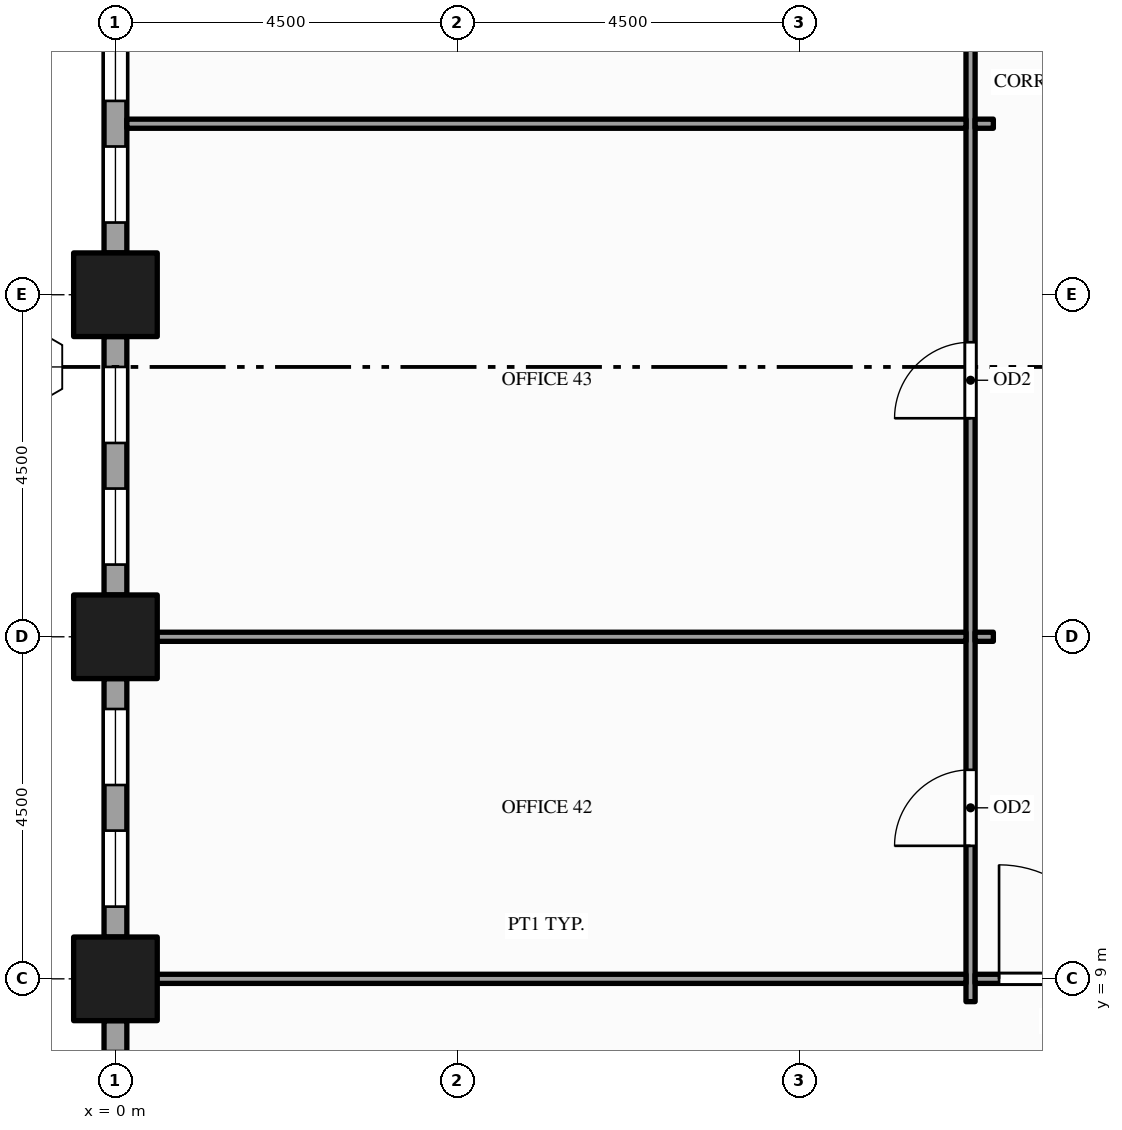
"""IFC4 building model, lengths in metres.
Left out: names, types, materials, properties, quantities, classifications, styles, units other than length and angle.
Written with IfcOpenShell. Run it as: python <this file> out.ifc"""

import sys

from ifc_helpers import new_model, si_unit, direction, frame, frame_2d, origin, origin_2d, place, context, subcontext, project, spatial, rectangle, hollow_rectangle, extrude, element, fill, save


model = new_model("IFC4")
c1 = context("Model", 3, precision=1e-05, world=origin(), true_north=direction((0.0, 1.0)))
c2 = subcontext(c1, "Body", "Model", "MODEL_VIEW")
j1 = project(units=[si_unit("LENGTHUNIT", "METRE"), si_unit("PLANEANGLEUNIT", "RADIAN")], contexts=[c1])
p1 = place(None, origin())
s1 = spatial("IfcSite", under=j1, at=p1, CompositionType="ELEMENT")
p2 = place(p1, origin())
s2 = spatial("IfcBuilding", under=s1, at=p2, CompositionType="ELEMENT")
p3 = place(p2, frame((0.0, 0.0, 57.0)))
s3 = spatial("IfcBuildingStorey", under=s2, at=p3, CompositionType="ELEMENT", Elevation=57.0)
for number, where, z_axis, x_axis in (
    (1, (0.0, 9.0, -0.15), (0.0, 0.0, 1.0), (1.0, 0.0, 0.0)),
    (2, (0.0, 13.5, -0.15), (0.0, 0.0, 1.0), (1.0, 0.0, 0.0)),
    (3, (0.0, 18.0, -0.15), (0.0, 0.0, 1.0), (1.0, 0.0, 0.0)),
):
    element("IfcColumn", number, at=place(p3, frame(where, z_axis=z_axis, x_axis=x_axis)), inside=s3, PredefinedType="COLUMN", context=c2, shape_type="SweptSolid", body=[
        extrude(hollow_rectangle(XDim=1.1, YDim=1.1, WallThickness=0.06, at=origin_2d()), origin(), (0.0, 0.0, 1.0), 4.0),
    ])
p4 = place(p3, frame((0.0, 21.95, 0.0), z_axis=(0.0, 0.0, 1.0), x_axis=(0.0, -1.0, 0.0)))
e4 = element("IfcWall", 4, at=p4, inside=s3, PredefinedType="STANDARD", context=c2, shape_type="SweptSolid", body=[
    extrude(rectangle(XDim=3.4, YDim=0.3, at=frame_2d((1.7, 0.0))), origin(), (0.0, 0.0, 1.0), 3.144),
])
p5 = place(p4, frame((0.4, 0.0, 0.9)))
e5 = element("IfcOpeningElement", 5, at=p5, cuts=e4, PredefinedType="OPENING", context=c2, shape_type="SweptSolid", body=[
    extrude(rectangle(XDim=1.0, YDim=2.0, at=frame_2d((0.5, 1.0))), frame((0.0, 0.16, 0.0), z_axis=(0.0, -1.0, 0.0), x_axis=(1.0, 0.0, 0.0)), (0.0, 0.0, 1.0), 0.32),
])
p6 = place(p4, frame((2.0, 0.0, 0.9)))
e6 = element("IfcOpeningElement", 6, at=p6, cuts=e4, PredefinedType="OPENING", context=c2, shape_type="SweptSolid", body=[
    extrude(rectangle(XDim=1.0, YDim=2.0, at=frame_2d((0.5, 1.0))), frame((0.0, 0.16, 0.0), z_axis=(0.0, -1.0, 0.0), x_axis=(1.0, 0.0, 0.0)), (0.0, 0.0, 1.0), 0.32),
])
p7 = place(p3, frame((0.0, 17.45, 0.0), z_axis=(0.0, 0.0, 1.0), x_axis=(0.0, -1.0, 0.0)))
e7 = element("IfcWall", 7, at=p7, inside=s3, PredefinedType="STANDARD", context=c2, shape_type="SweptSolid", body=[
    extrude(rectangle(XDim=3.4, YDim=0.3, at=frame_2d((1.7, 0.0))), origin(), (0.0, 0.0, 1.0), 3.144),
])
p8 = place(p7, frame((0.4, 0.0, 0.9)))
e8 = element("IfcOpeningElement", 8, at=p8, cuts=e7, PredefinedType="OPENING", context=c2, shape_type="SweptSolid", body=[
    extrude(rectangle(XDim=1.0, YDim=2.0, at=frame_2d((0.5, 1.0))), frame((0.0, 0.16, 0.0), z_axis=(0.0, -1.0, 0.0), x_axis=(1.0, 0.0, 0.0)), (0.0, 0.0, 1.0), 0.32),
])
p9 = place(p7, frame((2.0, 0.0, 0.9)))
e9 = element("IfcOpeningElement", 9, at=p9, cuts=e7, PredefinedType="OPENING", context=c2, shape_type="SweptSolid", body=[
    extrude(rectangle(XDim=1.0, YDim=2.0, at=frame_2d((0.5, 1.0))), frame((0.0, 0.16, 0.0), z_axis=(0.0, -1.0, 0.0), x_axis=(1.0, 0.0, 0.0)), (0.0, 0.0, 1.0), 0.32),
])
p10 = place(p3, frame((0.0, 12.95, 0.0), z_axis=(0.0, 0.0, 1.0), x_axis=(0.0, -1.0, 0.0)))
e10 = element("IfcWall", 10, at=p10, inside=s3, PredefinedType="STANDARD", context=c2, shape_type="SweptSolid", body=[
    extrude(rectangle(XDim=3.4, YDim=0.3, at=frame_2d((1.7, 0.0))), origin(), (0.0, 0.0, 1.0), 3.144),
])
p11 = place(p10, frame((0.4, 0.0, 0.9)))
e11 = element("IfcOpeningElement", 11, at=p11, cuts=e10, PredefinedType="OPENING", context=c2, shape_type="SweptSolid", body=[
    extrude(rectangle(XDim=1.0, YDim=2.0, at=frame_2d((0.5, 1.0))), frame((0.0, 0.16, 0.0), z_axis=(0.0, -1.0, 0.0), x_axis=(1.0, 0.0, 0.0)), (0.0, 0.0, 1.0), 0.32),
])
p12 = place(p10, frame((2.0, 0.0, 0.9)))
e12 = element("IfcOpeningElement", 12, at=p12, cuts=e10, PredefinedType="OPENING", context=c2, shape_type="SweptSolid", body=[
    extrude(rectangle(XDim=1.0, YDim=2.0, at=frame_2d((0.5, 1.0))), frame((0.0, 0.16, 0.0), z_axis=(0.0, -1.0, 0.0), x_axis=(1.0, 0.0, 0.0)), (0.0, 0.0, 1.0), 0.32),
])
p13 = place(p3, frame((0.0, 8.45, 0.0), z_axis=(0.0, 0.0, 1.0), x_axis=(0.0, -1.0, 0.0)))
e13 = element("IfcWall", 13, at=p13, inside=s3, PredefinedType="STANDARD", context=c2, shape_type="SweptSolid", body=[
    extrude(rectangle(XDim=3.4, YDim=0.3, at=frame_2d((1.7, 0.0))), origin(), (0.0, 0.0, 1.0), 3.144),
])
p14 = place(p13, frame((0.4, 0.0, 0.9)))
e14 = element("IfcOpeningElement", 14, at=p14, cuts=e13, PredefinedType="OPENING", context=c2, shape_type="SweptSolid", body=[
    extrude(rectangle(XDim=1.0, YDim=2.0, at=frame_2d((0.5, 1.0))), frame((0.0, 0.16, 0.0), z_axis=(0.0, -1.0, 0.0), x_axis=(1.0, 0.0, 0.0)), (0.0, 0.0, 1.0), 0.32),
])
p15 = place(p13, frame((2.0, 0.0, 0.9)))
e15 = element("IfcOpeningElement", 15, at=p15, cuts=e13, PredefinedType="OPENING", context=c2, shape_type="SweptSolid", body=[
    extrude(rectangle(XDim=1.0, YDim=2.0, at=frame_2d((0.5, 1.0))), frame((0.0, 0.16, 0.0), z_axis=(0.0, -1.0, 0.0), x_axis=(1.0, 0.0, 0.0)), (0.0, 0.0, 1.0), 0.32),
])
p16 = place(p3, frame((11.25, 8.7, 0.0), z_axis=(0.0, 0.0, 1.0), x_axis=(0.0, 1.0, 0.0)))
e16 = element("IfcWall", 16, at=p16, inside=s3, PredefinedType="PARTITIONING", context=c2, shape_type="SweptSolid", body=[
    extrude(rectangle(XDim=23.1, YDim=0.12, at=frame_2d((11.55, 0.0))), origin(), (0.0, 0.0, 1.0), 2.6),
])
p17 = place(p16, frame((2.05, 0.0, 0.0)))
e17 = element("IfcOpeningElement", 17, at=p17, cuts=e16, PredefinedType="OPENING", context=c2, shape_type="SweptSolid", body=[
    extrude(rectangle(XDim=1.0, YDim=2.1, at=frame_2d((0.5, 1.05))), frame((0.0, 0.07, 0.0), z_axis=(0.0, -1.0, 0.0), x_axis=(1.0, 0.0, 0.0)), (0.0, 0.0, 1.0), 0.14),
])
p18 = place(p16, frame((7.675, 0.0, 0.0)))
e18 = element("IfcOpeningElement", 18, at=p18, cuts=e16, PredefinedType="OPENING", context=c2, shape_type="SweptSolid", body=[
    extrude(rectangle(XDim=1.0, YDim=2.1, at=frame_2d((0.5, 1.05))), frame((0.0, 0.07, 0.0), z_axis=(0.0, -1.0, 0.0), x_axis=(1.0, 0.0, 0.0)), (0.0, 0.0, 1.0), 0.14),
])
p19 = place(p16, frame((14.055, 0.0, 0.0)))
e19 = element("IfcOpeningElement", 19, at=p19, cuts=e16, PredefinedType="OPENING", context=c2, shape_type="SweptSolid", body=[
    extrude(rectangle(XDim=1.8, YDim=2.1, at=frame_2d((0.9, 1.05))), frame((0.0, 0.07, 0.0), z_axis=(0.0, -1.0, 0.0), x_axis=(1.0, 0.0, 0.0)), (0.0, 0.0, 1.0), 0.14),
])
p20 = place(p3, frame((0.15, 9.0, 0.0), z_axis=(0.0, 0.0, 1.0), x_axis=(1.0, 0.0, 0.0)))
e20 = element("IfcWall", 20, at=p20, inside=s3, PredefinedType="PARTITIONING", context=c2, shape_type="SweptSolid", body=[
    extrude(rectangle(XDim=11.04, YDim=0.12, at=frame_2d((5.52, 0.0))), origin(), (0.0, 0.0, 1.0), 2.938),
])
p21 = place(p3, frame((11.31, 9.0, 0.0), z_axis=(0.0, 0.0, 1.0), x_axis=(1.0, 0.0, 0.0)))
e21 = element("IfcWall", 21, at=p21, inside=s3, PredefinedType="PARTITIONING", context=c2, shape_type="SweptSolid", body=[
    extrude(rectangle(XDim=2.13, YDim=0.12, at=frame_2d((1.065, 0.0))), origin(), (0.0, 0.0, 1.0), 2.938),
])
p22 = place(p21, frame((0.315, 0.0, 0.0)))
e22 = element("IfcOpeningElement", 22, at=p22, cuts=e21, PredefinedType="OPENING", context=c2, shape_type="SweptSolid", body=[
    extrude(rectangle(XDim=1.5, YDim=2.1, at=frame_2d((0.75, 1.05))), frame((0.0, 0.07, 0.0), z_axis=(0.0, -1.0, 0.0), x_axis=(1.0, 0.0, 0.0)), (0.0, 0.0, 1.0), 0.14),
])
p23 = place(p3, frame((0.15, 13.5, 0.0), z_axis=(0.0, 0.0, 1.0), x_axis=(1.0, 0.0, 0.0)))
e23 = element("IfcWall", 23, at=p23, inside=s3, PredefinedType="PARTITIONING", context=c2, shape_type="SweptSolid", body=[
    extrude(rectangle(XDim=11.04, YDim=0.12, at=frame_2d((5.52, 0.0))), origin(), (0.0, 0.0, 1.0), 2.938),
])
p24 = place(p3, frame((11.31, 13.5, 0.0), z_axis=(0.0, 0.0, 1.0), x_axis=(1.0, 0.0, 0.0)))
e24 = element("IfcWall", 24, at=p24, inside=s3, PredefinedType="PARTITIONING", context=c2, shape_type="SweptSolid", body=[
    extrude(rectangle(XDim=0.24, YDim=0.12, at=frame_2d((0.12, 0.0))), origin(), (0.0, 0.0, 1.0), 2.938),
])
p25 = place(p3, frame((0.15, 20.25, 0.0), z_axis=(0.0, 0.0, 1.0), x_axis=(1.0, 0.0, 0.0)))
e25 = element("IfcWall", 25, at=p25, inside=s3, PredefinedType="PARTITIONING", context=c2, shape_type="SweptSolid", body=[
    extrude(rectangle(XDim=11.04, YDim=0.12, at=frame_2d((5.52, 0.0))), origin(), (0.0, 0.0, 1.0), 2.938),
])
p26 = place(p3, frame((11.31, 20.25, 0.0), z_axis=(0.0, 0.0, 1.0), x_axis=(1.0, 0.0, 0.0)))
e26 = element("IfcWall", 26, at=p26, inside=s3, PredefinedType="PARTITIONING", context=c2, shape_type="SweptSolid", body=[
    extrude(rectangle(XDim=0.24, YDim=0.12, at=frame_2d((0.12, 0.0))), origin(), (0.0, 0.0, 1.0), 2.938),
])
p27 = place(p5, origin())
e27 = element("IfcWindow", 27, at=p27, inside=s3, PartitioningType="SINGLE_PANEL", PredefinedType="WINDOW", context=c2, shape_type="SweptSolid", body=[
    extrude(rectangle(XDim=1.0, YDim=2.0, at=frame_2d((0.5, 1.0))), frame((0.0, 0.03, 0.0), z_axis=(0.0, -1.0, 0.0), x_axis=(1.0, 0.0, 0.0)), (0.0, 0.0, 1.0), 0.06),
])
fill(e5, e27)
p28 = place(p6, origin())
e28 = element("IfcWindow", 28, at=p28, inside=s3, PartitioningType="SINGLE_PANEL", PredefinedType="WINDOW", context=c2, shape_type="SweptSolid", body=[
    extrude(rectangle(XDim=1.0, YDim=2.0, at=frame_2d((0.5, 1.0))), frame((0.0, 0.03, 0.0), z_axis=(0.0, -1.0, 0.0), x_axis=(1.0, 0.0, 0.0)), (0.0, 0.0, 1.0), 0.06),
])
fill(e6, e28)
p29 = place(p8, origin())
e29 = element("IfcWindow", 29, at=p29, inside=s3, PartitioningType="SINGLE_PANEL", PredefinedType="WINDOW", context=c2, shape_type="SweptSolid", body=[
    extrude(rectangle(XDim=1.0, YDim=2.0, at=frame_2d((0.5, 1.0))), frame((0.0, 0.03, 0.0), z_axis=(0.0, -1.0, 0.0), x_axis=(1.0, 0.0, 0.0)), (0.0, 0.0, 1.0), 0.06),
])
fill(e8, e29)
p30 = place(p9, origin())
e30 = element("IfcWindow", 30, at=p30, inside=s3, PartitioningType="SINGLE_PANEL", PredefinedType="WINDOW", context=c2, shape_type="SweptSolid", body=[
    extrude(rectangle(XDim=1.0, YDim=2.0, at=frame_2d((0.5, 1.0))), frame((0.0, 0.03, 0.0), z_axis=(0.0, -1.0, 0.0), x_axis=(1.0, 0.0, 0.0)), (0.0, 0.0, 1.0), 0.06),
])
fill(e9, e30)
p31 = place(p11, origin())
e31 = element("IfcWindow", 31, at=p31, inside=s3, PartitioningType="SINGLE_PANEL", PredefinedType="WINDOW", context=c2, shape_type="SweptSolid", body=[
    extrude(rectangle(XDim=1.0, YDim=2.0, at=frame_2d((0.5, 1.0))), frame((0.0, 0.03, 0.0), z_axis=(0.0, -1.0, 0.0), x_axis=(1.0, 0.0, 0.0)), (0.0, 0.0, 1.0), 0.06),
])
fill(e11, e31)
p32 = place(p12, origin())
e32 = element("IfcWindow", 32, at=p32, inside=s3, PartitioningType="SINGLE_PANEL", PredefinedType="WINDOW", context=c2, shape_type="SweptSolid", body=[
    extrude(rectangle(XDim=1.0, YDim=2.0, at=frame_2d((0.5, 1.0))), frame((0.0, 0.03, 0.0), z_axis=(0.0, -1.0, 0.0), x_axis=(1.0, 0.0, 0.0)), (0.0, 0.0, 1.0), 0.06),
])
fill(e12, e32)
p33 = place(p22, origin())
e33 = element("IfcDoor", 33, at=p33, inside=s3, OperationType="SINGLE_SWING_LEFT", PredefinedType="DOOR", context=c2, shape_type="SweptSolid", body=[
    extrude(rectangle(XDim=1.5, YDim=2.1, at=frame_2d((0.75, 1.05))), frame((0.0, 0.025, 0.0), z_axis=(0.0, -1.0, 0.0), x_axis=(1.0, 0.0, 0.0)), (0.0, 0.0, 1.0), 0.05),
])
fill(e22, e33)
p34 = place(p17, origin())
e34 = element("IfcDoor", 34, at=p34, inside=s3, OperationType="SINGLE_SWING_LEFT", PredefinedType="DOOR", context=c2, shape_type="SweptSolid", body=[
    extrude(rectangle(XDim=1.0, YDim=2.1, at=frame_2d((0.5, 1.05))), frame((0.0, 0.025, 0.0), z_axis=(0.0, -1.0, 0.0), x_axis=(1.0, 0.0, 0.0)), (0.0, 0.0, 1.0), 0.05),
])
fill(e17, e34)
p35 = place(p18, origin())
e35 = element("IfcDoor", 35, at=p35, inside=s3, OperationType="SINGLE_SWING_LEFT", PredefinedType="DOOR", context=c2, shape_type="SweptSolid", body=[
    extrude(rectangle(XDim=1.0, YDim=2.1, at=frame_2d((0.5, 1.05))), frame((0.0, 0.025, 0.0), z_axis=(0.0, -1.0, 0.0), x_axis=(1.0, 0.0, 0.0)), (0.0, 0.0, 1.0), 0.05),
])
fill(e18, e35)
save(model, sys.argv[1])
